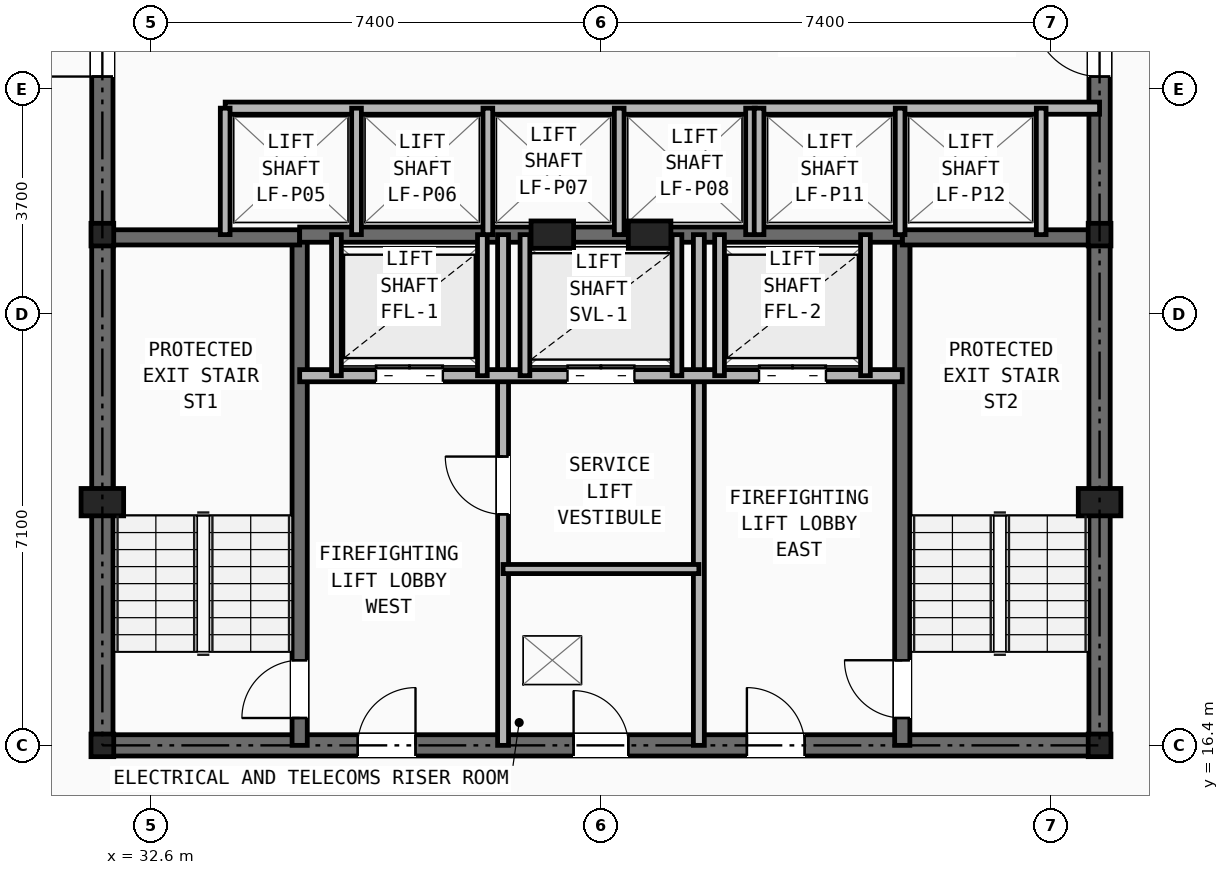
"""IFC4 building model, lengths in metres.
Left out: names, types, materials, properties, quantities, classifications, styles, units other than length and angle.
Written with IfcOpenShell. Run it as: python <this file> out.ifc"""

import sys

from ifc_helpers import new_model, si_unit, direction, frame, frame_2d, origin, origin_2d, place, context, subcontext, project, spatial, rectangle, i_section, extrude, element, fill, save


model = new_model("IFC4")
c1 = context("Model", 3, precision=1e-05, world=origin(), true_north=direction((0.0, 1.0)))
c2 = subcontext(c1, "Body", "Model", "MODEL_VIEW")
j1 = project(units=[si_unit("LENGTHUNIT", "METRE"), si_unit("PLANEANGLEUNIT", "RADIAN")], contexts=[c1])
p1 = place(None, origin())
s1 = spatial("IfcSite", under=j1, at=p1, CompositionType="ELEMENT")
p2 = place(p1, origin())
s2 = spatial("IfcBuilding", under=s1, at=p2, CompositionType="ELEMENT")
p3 = place(p2, frame((0.0, 0.0, 65.6)))
s3 = spatial("IfcBuildingStorey", under=s2, at=p3, CompositionType="ELEMENT", Elevation=65.6)
for number, where, z_axis, x_axis in (
    (1, (31.8, 16.4, 0.0), (0.0, 0.0, 1.0), (1.0, 0.0, 0.0)),
    (2, (48.2, 16.4, 0.0), (0.0, 0.0, 1.0), (1.0, 0.0, 0.0)),
    (3, (31.8, 24.8, 0.0), (0.0, 0.0, 1.0), (1.0, 0.0, 0.0)),
    (4, (48.2, 24.8, 0.0), (0.0, 0.0, 1.0), (1.0, 0.0, 0.0)),
):
    element("IfcColumn", number, at=place(p3, frame(where, z_axis=z_axis, x_axis=x_axis)), inside=s3, PredefinedType="COLUMN", context=c2, shape_type="SweptSolid", body=[
        extrude(i_section(OverallWidth=0.374, OverallDepth=0.372, WebThickness=0.016, FlangeThickness=0.026, at=origin_2d()), origin(), (0.0, 0.0, 1.0), 3.2),
    ])
for number, where, z_axis, x_axis in (
    (5, (31.8, 20.4, 0.0), (0.0, 0.0, 1.0), (1.0, 0.0, 0.0)),
    (6, (48.2, 20.4, 0.0), (0.0, 0.0, 1.0), (1.0, 0.0, 0.0)),
    (7, (39.2, 24.8, 0.0), (0.0, 0.0, 1.0), (1.0, 0.0, 0.0)),
    (8, (40.8, 24.8, 0.0), (0.0, 0.0, 1.0), (1.0, 0.0, 0.0)),
):
    element("IfcColumn", number, at=place(p3, frame(where, z_axis=z_axis, x_axis=x_axis)), inside=s3, PredefinedType="PILASTER", context=c2, shape_type="SweptSolid", body=[
        extrude(rectangle(XDim=0.7, YDim=0.45, at=origin_2d()), origin(), (0.0, 0.0, 1.0), 3.2),
    ])
p4 = place(p3, frame((31.8, 16.4, 0.0), z_axis=(0.0, 0.0, 1.0), x_axis=(1.0, 0.0, 0.0)))
e9 = element("IfcWall", 9, at=p4, inside=s3, PredefinedType="SHEAR", context=c2, shape_type="SweptSolid", body=[
    extrude(rectangle(XDim=16.4, YDim=0.35, at=frame_2d((8.2, 0.0))), origin(), (0.0, 0.0, 1.0), 2.9),
])
p5 = place(p4, frame((7.75, 0.0, 0.0)))
e10 = element("IfcOpeningElement", 10, at=p5, cuts=e9, PredefinedType="OPENING", context=c2, shape_type="SweptSolid", body=[
    extrude(rectangle(XDim=0.9, YDim=2.1, at=frame_2d((0.45, 1.05))), frame((0.0, 0.185, 0.0), z_axis=(0.0, -1.0, 0.0), x_axis=(1.0, 0.0, 0.0)), (0.0, 0.0, 1.0), 0.37),
])
p6 = place(p4, frame((4.2, 0.0, 0.0)))
e11 = element("IfcOpeningElement", 11, at=p6, cuts=e9, PredefinedType="OPENING", context=c2, shape_type="SweptSolid", body=[
    extrude(rectangle(XDim=0.95, YDim=2.1, at=frame_2d((0.475, 1.05))), frame((0.0, 0.185, 0.0), z_axis=(0.0, -1.0, 0.0), x_axis=(1.0, 0.0, 0.0)), (0.0, 0.0, 1.0), 0.37),
])
p7 = place(p4, frame((10.6, 0.0, 0.0)))
e12 = element("IfcOpeningElement", 12, at=p7, cuts=e9, PredefinedType="OPENING", context=c2, shape_type="SweptSolid", body=[
    extrude(rectangle(XDim=0.95, YDim=2.1, at=frame_2d((0.475, 1.05))), frame((0.0, 0.185, 0.0), z_axis=(0.0, -1.0, 0.0), x_axis=(1.0, 0.0, 0.0)), (0.0, 0.0, 1.0), 0.37),
])
p8 = place(p3, frame((31.8, 16.4, 0.0), z_axis=(0.0, 0.0, 1.0), x_axis=(0.0, 1.0, 0.0)))
e13 = element("IfcWall", 13, at=p8, inside=s3, PredefinedType="SHEAR", context=c2, shape_type="SweptSolid", body=[
    extrude(rectangle(XDim=14.8, YDim=0.35, at=frame_2d((7.4, 0.0))), origin(), (0.0, 0.0, 1.0), 2.9),
])
p9 = place(p8, frame((11.0, 0.0, 0.0)))
e14 = element("IfcOpeningElement", 14, at=p9, cuts=e13, PredefinedType="OPENING", context=c2, shape_type="SweptSolid", body=[
    extrude(rectangle(XDim=1.1, YDim=2.15, at=frame_2d((0.55, 1.075))), frame((0.0, 0.185, 0.0), z_axis=(0.0, -1.0, 0.0), x_axis=(1.0, 0.0, 0.0)), (0.0, 0.0, 1.0), 0.37),
])
p10 = place(p3, frame((48.2, 16.4, 0.0), z_axis=(0.0, 0.0, 1.0), x_axis=(0.0, 1.0, 0.0)))
e15 = element("IfcWall", 15, at=p10, inside=s3, PredefinedType="SHEAR", context=c2, shape_type="SweptSolid", body=[
    extrude(rectangle(XDim=14.8, YDim=0.35, at=frame_2d((7.4, 0.0))), origin(), (0.0, 0.0, 1.0), 2.9),
])
p11 = place(p10, frame((11.0, 0.0, 0.0)))
e16 = element("IfcOpeningElement", 16, at=p11, cuts=e15, PredefinedType="OPENING", context=c2, shape_type="SweptSolid", body=[
    extrude(rectangle(XDim=1.1, YDim=2.15, at=frame_2d((0.55, 1.075))), frame((0.0, 0.185, 0.0), z_axis=(0.0, -1.0, 0.0), x_axis=(1.0, 0.0, 0.0)), (0.0, 0.0, 1.0), 0.37),
])
p12 = place(p3, frame((35.045, 16.4, 0.0), z_axis=(0.0, 0.0, 1.0), x_axis=(0.0, 1.0, 0.0)))
e17 = element("IfcWall", 17, at=p12, inside=s3, PredefinedType="SHEAR", context=c2, shape_type="SweptSolid", body=[
    extrude(rectangle(XDim=8.4, YDim=0.25, at=frame_2d((4.2, 0.0))), origin(), (0.0, 0.0, 1.0), 2.9),
])
p13 = place(p12, frame((0.45, 0.0, 0.0)))
e18 = element("IfcOpeningElement", 18, at=p13, cuts=e17, PredefinedType="OPENING", context=c2, shape_type="SweptSolid", body=[
    extrude(rectangle(XDim=0.95, YDim=2.1, at=frame_2d((0.475, 1.05))), frame((0.0, 0.135, 0.0), z_axis=(0.0, -1.0, 0.0), x_axis=(1.0, 0.0, 0.0)), (0.0, 0.0, 1.0), 0.27),
])
p14 = place(p3, frame((31.8, 24.755, 0.0), z_axis=(0.0, 0.0, 1.0), x_axis=(1.0, 0.0, 0.0)))
e19 = element("IfcWall", 19, at=p14, inside=s3, PredefinedType="SHEAR", context=c2, shape_type="SweptSolid", body=[
    extrude(rectangle(XDim=3.245, YDim=0.25, at=frame_2d((1.623, 0.0))), origin(), (0.0, 0.0, 1.0), 2.9),
])
p15 = place(p3, frame((44.955, 16.4, 0.0), z_axis=(0.0, 0.0, 1.0), x_axis=(0.0, 1.0, 0.0)))
e20 = element("IfcWall", 20, at=p15, inside=s3, PredefinedType="SHEAR", context=c2, shape_type="SweptSolid", body=[
    extrude(rectangle(XDim=8.4, YDim=0.25, at=frame_2d((4.2, 0.0))), origin(), (0.0, 0.0, 1.0), 2.9),
])
p16 = place(p15, frame((0.45, 0.0, 0.0)))
e21 = element("IfcOpeningElement", 21, at=p16, cuts=e20, PredefinedType="OPENING", context=c2, shape_type="SweptSolid", body=[
    extrude(rectangle(XDim=0.95, YDim=2.1, at=frame_2d((0.475, 1.05))), frame((0.0, 0.135, 0.0), z_axis=(0.0, -1.0, 0.0), x_axis=(1.0, 0.0, 0.0)), (0.0, 0.0, 1.0), 0.27),
])
p17 = place(p3, frame((44.955, 24.755, 0.0), z_axis=(0.0, 0.0, 1.0), x_axis=(1.0, 0.0, 0.0)))
e22 = element("IfcWall", 22, at=p17, inside=s3, PredefinedType="SHEAR", context=c2, shape_type="SweptSolid", body=[
    extrude(rectangle(XDim=3.245, YDim=0.25, at=frame_2d((1.623, 0.0))), origin(), (0.0, 0.0, 1.0), 2.9),
])
p18 = place(p3, frame((35.045, 24.8, 0.0), z_axis=(0.0, 0.0, 1.0), x_axis=(1.0, 0.0, 0.0)))
e23 = element("IfcWall", 23, at=p18, inside=s3, PredefinedType="SHEAR", context=c2, shape_type="SweptSolid", body=[
    extrude(rectangle(XDim=9.91, YDim=0.25, at=frame_2d((4.955, 0.0))), origin(), (0.0, 0.0, 1.0), 2.9),
])
p19 = place(p3, frame((38.39, 16.4, 0.0), z_axis=(0.0, 0.0, 1.0), x_axis=(0.0, 1.0, 0.0)))
e24 = element("IfcWall", 24, at=p19, inside=s3, PredefinedType="PARTITIONING", context=c2, shape_type="SweptSolid", body=[
    extrude(rectangle(XDim=8.4, YDim=0.18, at=frame_2d((4.2, 0.0))), origin(), (0.0, 0.0, 1.0), 2.351),
])
p20 = place(p19, frame((3.8, 0.0, 0.0)))
e25 = element("IfcOpeningElement", 25, at=p20, cuts=e24, PredefinedType="OPENING", context=c2, shape_type="SweptSolid", body=[
    extrude(rectangle(XDim=0.95, YDim=2.1, at=frame_2d((0.475, 1.05))), frame((0.0, 0.1, 0.0), z_axis=(0.0, -1.0, 0.0), x_axis=(1.0, 0.0, 0.0)), (0.0, 0.0, 1.0), 0.2),
])
p21 = place(p3, frame((41.61, 16.4, 0.0), z_axis=(0.0, 0.0, 1.0), x_axis=(0.0, 1.0, 0.0)))
e26 = element("IfcWall", 26, at=p21, inside=s3, PredefinedType="PARTITIONING", context=c2, shape_type="SweptSolid", body=[
    extrude(rectangle(XDim=8.4, YDim=0.18, at=frame_2d((4.2, 0.0))), origin(), (0.0, 0.0, 1.0), 2.351),
])
p22 = place(p3, frame((35.045, 22.48, 0.0), z_axis=(0.0, 0.0, 1.0), x_axis=(1.0, 0.0, 0.0)))
e27 = element("IfcWall", 27, at=p22, inside=s3, PredefinedType="SOLIDWALL", context=c2, shape_type="SweptSolid", body=[
    extrude(rectangle(XDim=9.91, YDim=0.2, at=frame_2d((4.955, 0.0))), origin(), (0.0, 0.0, 1.0), 2.9),
])
p23 = place(p22, frame((1.255, 0.0, 0.0)))
e28 = element("IfcOpeningElement", 28, at=p23, cuts=e27, PredefinedType="OPENING", context=c2, shape_type="SweptSolid", body=[
    extrude(rectangle(XDim=1.1, YDim=2.15, at=frame_2d((0.55, 1.075))), frame((0.0, 0.11, 0.0), z_axis=(0.0, -1.0, 0.0), x_axis=(1.0, 0.0, 0.0)), (0.0, 0.0, 1.0), 0.22),
])
p24 = place(p22, frame((7.555, 0.0, 0.0)))
e29 = element("IfcOpeningElement", 29, at=p24, cuts=e27, PredefinedType="OPENING", context=c2, shape_type="SweptSolid", body=[
    extrude(rectangle(XDim=1.1, YDim=2.15, at=frame_2d((0.55, 1.075))), frame((0.0, 0.11, 0.0), z_axis=(0.0, -1.0, 0.0), x_axis=(1.0, 0.0, 0.0)), (0.0, 0.0, 1.0), 0.22),
])
p25 = place(p22, frame((4.405, 0.0, 0.0)))
e30 = element("IfcOpeningElement", 30, at=p25, cuts=e27, PredefinedType="OPENING", context=c2, shape_type="SweptSolid", body=[
    extrude(rectangle(XDim=1.1, YDim=2.15, at=frame_2d((0.55, 1.075))), frame((0.0, 0.11, 0.0), z_axis=(0.0, -1.0, 0.0), x_axis=(1.0, 0.0, 0.0)), (0.0, 0.0, 1.0), 0.22),
])
p26 = place(p3, frame((38.39, 19.3, 0.0), z_axis=(0.0, 0.0, 1.0), x_axis=(1.0, 0.0, 0.0)))
e31 = element("IfcWall", 31, at=p26, inside=s3, PredefinedType="PARTITIONING", context=c2, shape_type="SweptSolid", body=[
    extrude(rectangle(XDim=3.22, YDim=0.15, at=frame_2d((1.61, 0.0))), origin(), (0.0, 0.0, 1.0), 2.9),
])
for number, where, z_axis, x_axis in (
    (32, (35.65, 22.48, 0.0), (0.0, 0.0, 1.0), (0.0, 1.0, 0.0)),
    (33, (38.05, 22.48, 0.0), (0.0, 0.0, 1.0), (0.0, 1.0, 0.0)),
    (34, (41.95, 22.48, 0.0), (0.0, 0.0, 1.0), (0.0, 1.0, 0.0)),
    (35, (44.35, 22.48, 0.0), (0.0, 0.0, 1.0), (0.0, 1.0, 0.0)),
    (36, (38.75, 22.48, 0.0), (0.0, 0.0, 1.0), (0.0, 1.0, 0.0)),
    (37, (41.25, 22.48, 0.0), (0.0, 0.0, 1.0), (0.0, 1.0, 0.0)),
):
    element("IfcWall", number, at=place(p3, frame(where, z_axis=z_axis, x_axis=x_axis)), inside=s3, PredefinedType="SOLIDWALL", context=c2, shape_type="SweptSolid", body=[
        extrude(rectangle(XDim=2.32, YDim=0.16, at=frame_2d((1.16, 0.0))), origin(), (0.0, 0.0, 1.0), 2.9),
    ])
p27 = place(p3, frame((33.82, 26.88, 0.0), z_axis=(0.0, 0.0, 1.0), x_axis=(1.0, 0.0, 0.0)))
e38 = element("IfcWall", 38, at=p27, inside=s3, PredefinedType="SOLIDWALL", context=c2, shape_type="SweptSolid", body=[
    extrude(rectangle(XDim=14.38, YDim=0.2, at=frame_2d((7.19, 0.0))), origin(), (0.0, 0.0, 1.0), 2.351),
])
for number, where, z_axis, x_axis in (
    (39, (33.82, 24.8, 0.0), (0.0, 0.0, 1.0), (0.0, 1.0, 0.0)),
    (40, (35.98, 24.8, 0.0), (0.0, 0.0, 1.0), (0.0, 1.0, 0.0)),
    (41, (38.14, 24.8, 0.0), (0.0, 0.0, 1.0), (0.0, 1.0, 0.0)),
    (42, (40.3, 24.8, 0.0), (0.0, 0.0, 1.0), (0.0, 1.0, 0.0)),
    (43, (42.46, 24.8, 0.0), (0.0, 0.0, 1.0), (0.0, 1.0, 0.0)),
    (44, (42.6, 24.8, 0.0), (0.0, 0.0, 1.0), (0.0, 1.0, 0.0)),
    (45, (44.92, 24.8, 0.0), (0.0, 0.0, 1.0), (0.0, 1.0, 0.0)),
    (46, (47.24, 24.8, 0.0), (0.0, 0.0, 1.0), (0.0, 1.0, 0.0)),
):
    element("IfcWall", number, at=place(p3, frame(where, z_axis=z_axis, x_axis=x_axis)), inside=s3, PredefinedType="SOLIDWALL", context=c2, shape_type="SweptSolid", body=[
        extrude(rectangle(XDim=2.08, YDim=0.16, at=frame_2d((1.04, 0.0))), origin(), (0.0, 0.0, 1.0), 2.9),
    ])
p28 = place(p5, origin())
e47 = element("IfcDoor", 47, at=p28, inside=s3, OperationType="SINGLE_SWING_LEFT", PredefinedType="DOOR", context=c2, shape_type="SweptSolid", body=[
    extrude(rectangle(XDim=0.9, YDim=2.1, at=frame_2d((0.45, 1.05))), frame((0.0, 0.025, 0.0), z_axis=(0.0, -1.0, 0.0), x_axis=(1.0, 0.0, 0.0)), (0.0, 0.0, 1.0), 0.05),
])
fill(e10, e47)
p29 = place(p20, origin())
e48 = element("IfcDoor", 48, at=p29, inside=s3, OperationType="SINGLE_SWING_RIGHT", PredefinedType="DOOR", context=c2, shape_type="SweptSolid", body=[
    extrude(rectangle(XDim=0.95, YDim=2.1, at=frame_2d((0.475, 1.05))), frame((0.0, 0.025, 0.0), z_axis=(0.0, -1.0, 0.0), x_axis=(1.0, 0.0, 0.0)), (0.0, 0.0, 1.0), 0.05),
])
fill(e25, e48)
p30 = place(p13, origin())
e49 = element("IfcDoor", 49, at=p30, inside=s3, OperationType="SINGLE_SWING_LEFT", PredefinedType="DOOR", context=c2, shape_type="SweptSolid", body=[
    extrude(rectangle(XDim=0.95, YDim=2.1, at=frame_2d((0.475, 1.05))), frame((0.0, 0.025, 0.0), z_axis=(0.0, -1.0, 0.0), x_axis=(1.0, 0.0, 0.0)), (0.0, 0.0, 1.0), 0.05),
])
fill(e18, e49)
p31 = place(p16, origin())
e50 = element("IfcDoor", 50, at=p31, inside=s3, OperationType="SINGLE_SWING_RIGHT", PredefinedType="DOOR", context=c2, shape_type="SweptSolid", body=[
    extrude(rectangle(XDim=0.95, YDim=2.1, at=frame_2d((0.475, 1.05))), frame((0.0, 0.025, 0.0), z_axis=(0.0, -1.0, 0.0), x_axis=(1.0, 0.0, 0.0)), (0.0, 0.0, 1.0), 0.05),
])
fill(e21, e50)
p32 = place(p6, origin())
e51 = element("IfcDoor", 51, at=p32, inside=s3, OperationType="SINGLE_SWING_RIGHT", PredefinedType="DOOR", context=c2, shape_type="SweptSolid", body=[
    extrude(rectangle(XDim=0.95, YDim=2.1, at=frame_2d((0.475, 1.05))), frame((0.0, 0.025, 0.0), z_axis=(0.0, -1.0, 0.0), x_axis=(1.0, 0.0, 0.0)), (0.0, 0.0, 1.0), 0.05),
])
fill(e11, e51)
p33 = place(p7, origin())
e52 = element("IfcDoor", 52, at=p33, inside=s3, OperationType="SINGLE_SWING_LEFT", PredefinedType="DOOR", context=c2, shape_type="SweptSolid", body=[
    extrude(rectangle(XDim=0.95, YDim=2.1, at=frame_2d((0.475, 1.05))), frame((0.0, 0.025, 0.0), z_axis=(0.0, -1.0, 0.0), x_axis=(1.0, 0.0, 0.0)), (0.0, 0.0, 1.0), 0.05),
])
fill(e12, e52)
p34 = place(p23, origin())
e53 = element("IfcDoor", 53, at=p34, inside=s3, OperationType="DOUBLE_DOOR_SLIDING", PredefinedType="DOOR", context=c2, shape_type="SweptSolid", body=[
    extrude(rectangle(XDim=1.1, YDim=2.15, at=frame_2d((0.55, 1.075))), frame((0.0, 0.025, 0.0), z_axis=(0.0, -1.0, 0.0), x_axis=(1.0, 0.0, 0.0)), (0.0, 0.0, 1.0), 0.05),
])
fill(e28, e53)
p35 = place(p24, origin())
e54 = element("IfcDoor", 54, at=p35, inside=s3, OperationType="DOUBLE_DOOR_SLIDING", PredefinedType="DOOR", context=c2, shape_type="SweptSolid", body=[
    extrude(rectangle(XDim=1.1, YDim=2.15, at=frame_2d((0.55, 1.075))), frame((0.0, 0.025, 0.0), z_axis=(0.0, -1.0, 0.0), x_axis=(1.0, 0.0, 0.0)), (0.0, 0.0, 1.0), 0.05),
])
fill(e29, e54)
p36 = place(p25, origin())
e55 = element("IfcDoor", 55, at=p36, inside=s3, OperationType="DOUBLE_DOOR_SLIDING", PredefinedType="DOOR", context=c2, shape_type="SweptSolid", body=[
    extrude(rectangle(XDim=1.1, YDim=2.15, at=frame_2d((0.55, 1.075))), frame((0.0, 0.025, 0.0), z_axis=(0.0, -1.0, 0.0), x_axis=(1.0, 0.0, 0.0)), (0.0, 0.0, 1.0), 0.05),
])
fill(e30, e55)
p37 = place(p9, origin())
e56 = element("IfcDoor", 56, at=p37, inside=s3, OperationType="SINGLE_SWING_LEFT", PredefinedType="DOOR", context=c2, shape_type="SweptSolid", body=[
    extrude(rectangle(XDim=1.1, YDim=2.15, at=frame_2d((0.55, 1.075))), frame((0.0, 0.025, 0.0), z_axis=(0.0, -1.0, 0.0), x_axis=(1.0, 0.0, 0.0)), (0.0, 0.0, 1.0), 0.05),
])
fill(e14, e56)
p38 = place(p11, origin())
e57 = element("IfcDoor", 57, at=p38, inside=s3, OperationType="SINGLE_SWING_RIGHT", PredefinedType="DOOR", context=c2, shape_type="SweptSolid", body=[
    extrude(rectangle(XDim=1.1, YDim=2.15, at=frame_2d((0.55, 1.075))), frame((0.0, 0.025, 0.0), z_axis=(0.0, -1.0, 0.0), x_axis=(1.0, 0.0, 0.0)), (0.0, 0.0, 1.0), 0.05),
])
fill(e16, e57)
save(model, sys.argv[1])
